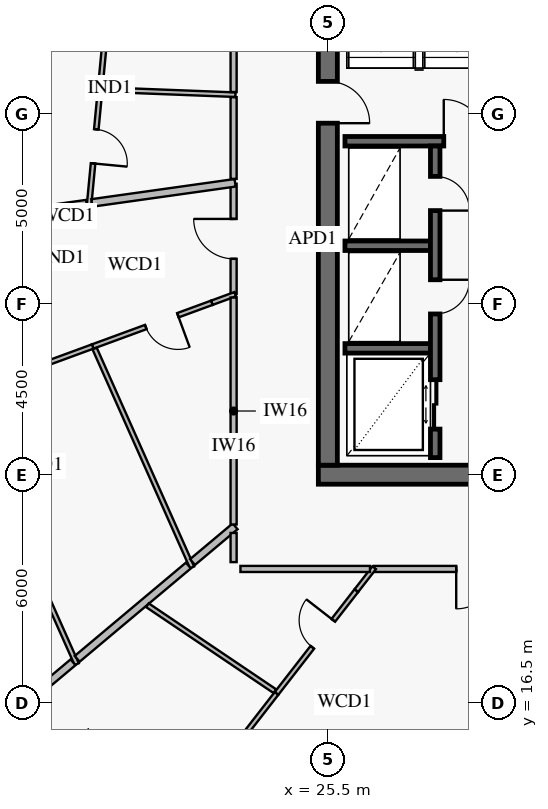
"""IFC4 building model, lengths in metres.
Left out: names, types, materials, properties, quantities, classifications, styles, units other than length and angle.
Written with IfcOpenShell. Run it as: python <this file> out.ifc"""

import sys

from ifc_helpers import new_model, si_unit, direction, frame, frame_2d, origin, place, context, subcontext, project, spatial, rectangle, extrude, element, fill, save


model = new_model("IFC4")
c1 = context("Model", 3, precision=1e-05, world=origin(), true_north=direction((0.0, 1.0)))
c2 = subcontext(c1, "Body", "Model", "MODEL_VIEW")
j1 = project(units=[si_unit("LENGTHUNIT", "METRE"), si_unit("PLANEANGLEUNIT", "RADIAN")], contexts=[c1])
p1 = place(None, origin())
s1 = spatial("IfcSite", under=j1, at=p1, CompositionType="ELEMENT")
p2 = place(p1, origin())
s2 = spatial("IfcBuilding", under=s1, at=p2, CompositionType="ELEMENT")
p3 = place(p2, frame((0.0, 0.0, 353.8)))
s3 = spatial("IfcBuildingStorey", under=s2, at=p3, CompositionType="ELEMENT", Elevation=353.8)
p4 = place(p3, frame((25.25, 22.5, 0.0), z_axis=(0.0, 0.0, 1.0), x_axis=(1.0, 0.0, 0.0)))
e1 = element("IfcWall", 1, at=p4, inside=s3, PredefinedType="SHEAR", context=c2, shape_type="SweptSolid", body=[
    extrude(rectangle(XDim=9.8, YDim=0.5, at=frame_2d((4.9, 0.0))), origin(), (0.0, 0.0, 1.0), 3.8),
])
p5 = place(p4, frame((4.15, 0.0, 0.0)))
e2 = element("IfcOpeningElement", 2, at=p5, cuts=e1, PredefinedType="OPENING", context=c2, shape_type="SweptSolid", body=[
    extrude(rectangle(XDim=1.5, YDim=2.15, at=frame_2d((0.75, 1.075))), frame((0.0, 0.262, 0.0), z_axis=(0.0, -1.0, 0.0), x_axis=(1.0, 0.0, 0.0)), (0.0, 0.0, 1.0), 0.524),
])
p6 = place(p3, frame((25.5, 22.75, 0.0), z_axis=(0.0, 0.0, 1.0), x_axis=(0.0, 1.0, 0.0)))
e3 = element("IfcWall", 3, at=p6, inside=s3, PredefinedType="SHEAR", context=c2, shape_type="SweptSolid", body=[
    extrude(rectangle(XDim=18.5, YDim=0.5, at=frame_2d((9.25, 0.0))), origin(), (0.0, 0.0, 1.0), 3.8),
])
p7 = place(p6, frame((9.0, 0.0, 0.0)))
e4 = element("IfcOpeningElement", 4, at=p7, cuts=e3, PredefinedType="OPENING", context=c2, shape_type="SweptSolid", body=[
    extrude(rectangle(XDim=1.1, YDim=2.15, at=frame_2d((0.55, 1.075))), frame((0.0, 0.262, 0.0), z_axis=(0.0, -1.0, 0.0), x_axis=(1.0, 0.0, 0.0)), (0.0, 0.0, 1.0), 0.524),
])
p8 = place(p3, frame((25.95, 31.275, 0.0), z_axis=(0.0, 0.0, 1.0), x_axis=(1.0, 0.0, 0.0)))
e5 = element("IfcWall", 5, at=p8, inside=s3, PredefinedType="SOLIDWALL", context=c2, shape_type="SweptSolid", body=[
    extrude(rectangle(XDim=20.1, YDim=0.25, at=frame_2d((10.05, 0.0))), origin(), (0.0, 0.0, 1.0), 3.8),
])
p9 = place(p8, frame((2.6, 0.0, 0.0)))
e6 = element("IfcOpeningElement", 6, at=p9, cuts=e5, PredefinedType="OPENING", context=c2, shape_type="SweptSolid", body=[
    extrude(rectangle(XDim=1.1, YDim=2.15, at=frame_2d((0.55, 1.075))), frame((0.0, 0.137, 0.0), z_axis=(0.0, -1.0, 0.0), x_axis=(1.0, 0.0, 0.0)), (0.0, 0.0, 1.0), 0.274),
])
p10 = place(p8, frame((10.6, 0.0, 0.0)))
e7 = element("IfcOpeningElement", 7, at=p10, cuts=e5, PredefinedType="OPENING", context=c2, shape_type="SweptSolid", body=[
    extrude(rectangle(XDim=1.1, YDim=2.15, at=frame_2d((0.55, 1.075))), frame((0.0, 0.137, 0.0), z_axis=(0.0, -1.0, 0.0), x_axis=(1.0, 0.0, 0.0)), (0.0, 0.0, 1.0), 0.274),
])
p11 = place(p8, frame((16.35, 0.0, 0.0)))
e8 = element("IfcOpeningElement", 8, at=p11, cuts=e5, PredefinedType="OPENING", context=c2, shape_type="SweptSolid", body=[
    extrude(rectangle(XDim=1.1, YDim=2.15, at=frame_2d((0.55, 1.075))), frame((0.0, 0.137, 0.0), z_axis=(0.0, -1.0, 0.0), x_axis=(1.0, 0.0, 0.0)), (0.0, 0.0, 1.0), 0.274),
])
for number, where, z_axis, x_axis in (
    (9, (25.95, 25.825, 0.0), (0.0, 0.0, 1.0), (1.0, 0.0, 0.0)),
    (10, (25.95, 28.525, 0.0), (0.0, 0.0, 1.0), (1.0, 0.0, 0.0)),
):
    element("IfcWall", number, at=place(p3, frame(where, z_axis=z_axis, x_axis=x_axis)), inside=s3, PredefinedType="SOLIDWALL", context=c2, shape_type="SweptSolid", body=[
        extrude(rectangle(XDim=2.25, YDim=0.25, at=frame_2d((1.125, 0.0))), origin(), (0.0, 0.0, 1.0), 3.8),
    ])
p12 = place(p3, frame((28.325, 22.95, 0.0), z_axis=(0.0, 0.0, 1.0), x_axis=(0.0, 1.0, 0.0)))
e11 = element("IfcWall", 11, at=p12, inside=s3, PredefinedType="SOLIDWALL", context=c2, shape_type="SweptSolid", body=[
    extrude(rectangle(XDim=8.2, YDim=0.25, at=frame_2d((4.1, 0.0))), origin(), (0.0, 0.0, 1.0), 3.8),
])
p13 = place(p12, frame((0.75, 0.0, 0.0)))
e12 = element("IfcOpeningElement", 12, at=p13, cuts=e11, PredefinedType="OPENING", context=c2, shape_type="SweptSolid", body=[
    extrude(rectangle(XDim=1.3, YDim=2.3, at=frame_2d((0.65, 1.15))), frame((0.0, 0.137, 0.0), z_axis=(0.0, -1.0, 0.0), x_axis=(1.0, 0.0, 0.0)), (0.0, 0.0, 1.0), 0.274),
])
p14 = place(p12, frame((3.78, 0.0, 0.0)))
e13 = element("IfcOpeningElement", 13, at=p14, cuts=e11, PredefinedType="OPENING", context=c2, shape_type="SweptSolid", body=[
    extrude(rectangle(XDim=0.9, YDim=2.1, at=frame_2d((0.45, 1.05))), frame((0.0, 0.137, 0.0), z_axis=(0.0, -1.0, 0.0), x_axis=(1.0, 0.0, 0.0)), (0.0, 0.0, 1.0), 0.274),
])
p15 = place(p12, frame((6.5, 0.0, 0.0)))
e14 = element("IfcOpeningElement", 14, at=p15, cuts=e11, PredefinedType="OPENING", context=c2, shape_type="SweptSolid", body=[
    extrude(rectangle(XDim=0.9, YDim=2.1, at=frame_2d((0.45, 1.05))), frame((0.0, 0.137, 0.0), z_axis=(0.0, -1.0, 0.0), x_axis=(1.0, 0.0, 0.0)), (0.0, 0.0, 1.0), 0.274),
])
p16 = place(p3, frame((19.979, 37.585, 0.0), z_axis=(0.0, 0.0, 1.0), x_axis=(-0.094824773931, -0.995493979012, 0.0)))
e15 = element("IfcWall", 15, at=p16, inside=s3, PredefinedType="PARTITIONING", context=c2, shape_type="SweptSolid", body=[
    extrude(rectangle(XDim=8.082, YDim=0.12, at=frame_2d((4.041, 0.0))), origin(), (0.0, 0.0, 1.0), 2.8),
])
p17 = place(p16, frame((2.061, 0.0, 0.0)))
e16 = element("IfcOpeningElement", 16, at=p17, cuts=e15, PredefinedType="OPENING", context=c2, shape_type="SweptSolid", body=[
    extrude(rectangle(XDim=0.95, YDim=2.1, at=frame_2d((0.475, 1.05))), frame((0.0, 0.072, 0.0), z_axis=(0.0, -1.0, 0.0), x_axis=(1.0, 0.0, 0.0)), (0.0, 0.0, 1.0), 0.144),
])
p18 = place(p16, frame((6.024, 0.0, 0.0)))
e17 = element("IfcOpeningElement", 17, at=p18, cuts=e15, PredefinedType="OPENING", context=c2, shape_type="SweptSolid", body=[
    extrude(rectangle(XDim=0.9, YDim=2.1, at=frame_2d((0.45, 1.05))), frame((0.0, 0.072, 0.0), z_axis=(0.0, -1.0, 0.0), x_axis=(1.0, 0.0, 0.0)), (0.0, 0.0, 1.0), 0.144),
])
p19 = place(p3, frame((18.5, 38.091, 0.0), z_axis=(0.0, 0.0, 1.0), x_axis=(-0.094793396489, -0.995496967339, 0.0)))
e18 = element("IfcWall", 18, at=p19, inside=s3, PredefinedType="PARTITIONING", context=c2, shape_type="SweptSolid", body=[
    extrude(rectangle(XDim=8.808, YDim=0.12, at=frame_2d((4.404, 0.0))), origin(), (0.0, 0.0, 1.0), 2.8),
])
p20 = place(p19, frame((1.072, 0.0, 0.0)))
e19 = element("IfcOpeningElement", 19, at=p20, cuts=e18, PredefinedType="OPENING", context=c2, shape_type="SweptSolid", body=[
    extrude(rectangle(XDim=0.95, YDim=2.1, at=frame_2d((0.475, 1.05))), frame((0.0, 0.072, 0.0), z_axis=(0.0, -1.0, 0.0), x_axis=(1.0, 0.0, 0.0)), (0.0, 0.0, 1.0), 0.144),
])
p21 = place(p19, frame((3.929, 0.0, 0.0)))
e20 = element("IfcOpeningElement", 20, at=p21, cuts=e18, PredefinedType="OPENING", context=c2, shape_type="SweptSolid", body=[
    extrude(rectangle(XDim=0.95, YDim=2.1, at=frame_2d((0.475, 1.05))), frame((0.0, 0.072, 0.0), z_axis=(0.0, -1.0, 0.0), x_axis=(1.0, 0.0, 0.0)), (0.0, 0.0, 1.0), 0.144),
])
p22 = place(p19, frame((6.786, 0.0, 0.0)))
e21 = element("IfcOpeningElement", 21, at=p22, cuts=e18, PredefinedType="OPENING", context=c2, shape_type="SweptSolid", body=[
    extrude(rectangle(XDim=0.95, YDim=2.1, at=frame_2d((0.475, 1.05))), frame((0.0, 0.072, 0.0), z_axis=(0.0, -1.0, 0.0), x_axis=(1.0, 0.0, 0.0)), (0.0, 0.0, 1.0), 0.144),
])
p23 = place(p3, frame((22.45, 27.025, 0.0), z_axis=(0.0, 0.0, 1.0), x_axis=(-0.938729085526, -0.344655921155, 0.0)))
e22 = element("IfcWall", 22, at=p23, inside=s3, PredefinedType="PARTITIONING", context=c2, shape_type="SweptSolid", body=[
    extrude(rectangle(XDim=3.343, YDim=0.12, at=frame_2d((1.671, 0.0))), origin(), (0.0, 0.0, 1.0), 3.35),
])
p24 = place(p23, frame((0.954, 0.0, 0.0)))
e23 = element("IfcOpeningElement", 23, at=p24, cuts=e22, PredefinedType="OPENING", context=c2, shape_type="SweptSolid", body=[
    extrude(rectangle(XDim=0.9, YDim=2.1, at=frame_2d((0.45, 1.05))), frame((0.0, 0.072, 0.0), z_axis=(0.0, -1.0, 0.0), x_axis=(1.0, 0.0, 0.0)), (0.0, 0.0, 1.0), 0.144),
])
p25 = place(p3, frame((19.312, 25.873, 0.0), z_axis=(0.0, 0.0, 1.0), x_axis=(-0.938737752341, -0.344632314692, 0.0)))
e24 = element("IfcWall", 24, at=p25, inside=s3, PredefinedType="PARTITIONING", context=c2, shape_type="SweptSolid", body=[
    extrude(rectangle(XDim=3.818, YDim=0.12, at=frame_2d((1.909, 0.0))), origin(), (0.0, 0.0, 1.0), 3.0),
])
p26 = place(p25, frame((1.409, 0.0, 0.0)))
e25 = element("IfcOpeningElement", 25, at=p26, cuts=e24, PredefinedType="OPENING", context=c2, shape_type="SweptSolid", body=[
    extrude(rectangle(XDim=0.95, YDim=2.1, at=frame_2d((0.475, 1.05))), frame((0.0, 0.072, 0.0), z_axis=(0.0, -1.0, 0.0), x_axis=(1.0, 0.0, 0.0)), (0.0, 0.0, 1.0), 0.144),
])
p27 = place(p3, frame((15.779, 24.504, 0.0), z_axis=(0.0, 0.0, 1.0), x_axis=(0.406754151675, -0.913537662111, 0.0)))
e26 = element("IfcWall", 26, at=p27, inside=s3, PredefinedType="PARTITIONING", context=c2, shape_type="SweptSolid", body=[
    extrude(rectangle(XDim=7.652, YDim=0.12, at=frame_2d((3.826, 0.0))), origin(), (0.0, 0.0, 1.0), 3.35),
])
p28 = place(p27, frame((3.267, 0.0, 0.0)))
e27 = element("IfcOpeningElement", 27, at=p28, cuts=e26, PredefinedType="OPENING", context=c2, shape_type="SweptSolid", body=[
    extrude(rectangle(XDim=0.95, YDim=2.1, at=frame_2d((0.475, 1.05))), frame((0.0, 0.072, 0.0), z_axis=(0.0, -1.0, 0.0), x_axis=(1.0, 0.0, 0.0)), (0.0, 0.0, 1.0), 0.144),
])
p29 = place(p3, frame((23.02, 30.156, 0.0), z_axis=(0.0, 0.0, 1.0), x_axis=(0.0, -1.0, 0.0)))
e28 = element("IfcWall", 28, at=p29, inside=s3, PredefinedType="PARTITIONING", context=c2, shape_type="SweptSolid", body=[
    extrude(rectangle(XDim=2.9, YDim=0.16, at=frame_2d((1.45, 0.0))), origin(), (0.0, 0.0, 1.0), 2.8),
])
p30 = place(p29, frame((0.925, 0.0, 0.0)))
e29 = element("IfcOpeningElement", 29, at=p30, cuts=e28, PredefinedType="OPENING", context=c2, shape_type="SweptSolid", body=[
    extrude(rectangle(XDim=1.05, YDim=2.15, at=frame_2d((0.525, 1.075))), frame((0.0, 0.092, 0.0), z_axis=(0.0, -1.0, 0.0), x_axis=(1.0, 0.0, 0.0)), (0.0, 0.0, 1.0), 0.184),
])
p31 = place(p3, frame((26.251, 19.45, 0.0), z_axis=(0.0, 0.0, 1.0), x_axis=(-0.613467016109, -0.789720342999, 0.0)))
e30 = element("IfcWall", 30, at=p31, inside=s3, PredefinedType="PARTITIONING", context=c2, shape_type="SweptSolid", body=[
    extrude(rectangle(XDim=3.427, YDim=0.12, at=frame_2d((1.713, 0.0))), origin(), (0.0, 0.0, 1.0), 3.35),
])
p32 = place(p31, frame((0.989, 0.0, 0.0)))
e31 = element("IfcOpeningElement", 31, at=p32, cuts=e30, PredefinedType="OPENING", context=c2, shape_type="SweptSolid", body=[
    extrude(rectangle(XDim=0.9, YDim=2.1, at=frame_2d((0.45, 1.05))), frame((0.0, 0.072, 0.0), z_axis=(0.0, -1.0, 0.0), x_axis=(1.0, 0.0, 0.0)), (0.0, 0.0, 1.0), 0.144),
])
p33 = place(p3, frame((24.149, 16.744, 0.0), z_axis=(0.0, 0.0, 1.0), x_axis=(-0.613439949778, -0.789741367801, 0.0)))
e32 = element("IfcWall", 32, at=p33, inside=s3, PredefinedType="PARTITIONING", context=c2, shape_type="SweptSolid", body=[
    extrude(rectangle(XDim=3.073, YDim=0.12, at=frame_2d((1.536, 0.0))), origin(), (0.0, 0.0, 1.0), 3.35),
])
p34 = place(p33, frame((1.628, 0.0, 0.0)))
e33 = element("IfcOpeningElement", 33, at=p34, cuts=e32, PredefinedType="OPENING", context=c2, shape_type="SweptSolid", body=[
    extrude(rectangle(XDim=0.95, YDim=2.1, at=frame_2d((0.475, 1.05))), frame((0.0, 0.072, 0.0), z_axis=(0.0, -1.0, 0.0), x_axis=(1.0, 0.0, 0.0)), (0.0, 0.0, 1.0), 0.144),
])
p35 = place(p3, frame((26.719, 20.02, 0.0), z_axis=(0.0, 0.0, 1.0), x_axis=(1.0, 0.0, 0.0)))
e34 = element("IfcWall", 34, at=p35, inside=s3, PredefinedType="PARTITIONING", context=c2, shape_type="SweptSolid", body=[
    extrude(rectangle(XDim=5.367, YDim=0.16, at=frame_2d((2.684, 0.0))), origin(), (0.0, 0.0, 1.0), 3.35),
])
p36 = place(p35, frame((2.158, 0.0, 0.0)))
e35 = element("IfcOpeningElement", 35, at=p36, cuts=e34, PredefinedType="OPENING", context=c2, shape_type="SweptSolid", body=[
    extrude(rectangle(XDim=1.05, YDim=2.15, at=frame_2d((0.525, 1.075))), frame((0.0, 0.092, 0.0), z_axis=(0.0, -1.0, 0.0), x_axis=(1.0, 0.0, 0.0)), (0.0, 0.0, 1.0), 0.184),
])
p37 = place(p3, frame((23.07, 32.5, 0.0), z_axis=(0.0, 0.0, 1.0), x_axis=(-0.999254664498, 0.038602013934, 0.0)))
e36 = element("IfcWall", 36, at=p37, inside=s3, PredefinedType="PARTITIONING", context=c2, shape_type="SweptSolid", body=[
    extrude(rectangle(XDim=3.498, YDim=0.12, at=frame_2d((1.749, 0.0))), origin(), (0.0, 0.0, 1.0), 3.35),
])
p38 = place(p3, frame((23.06, 30.181, 0.0), z_axis=(0.0, 0.0, 1.0), x_axis=(-0.990263903047, -0.139202738201, 0.0)))
e37 = element("IfcWall", 37, at=p38, inside=s3, PredefinedType="PARTITIONING", context=c2, shape_type="SweptSolid", body=[
    extrude(rectangle(XDim=3.806, YDim=0.2, at=frame_2d((1.903, 0.0))), origin(), (0.0, 0.0, 1.0), 3.35),
])
p39 = place(p3, frame((19.153, 29.632, 0.0), z_axis=(0.0, 0.0, 1.0), x_axis=(-0.990245854096, -0.139331074948, 0.0)))
e38 = element("IfcWall", 38, at=p39, inside=s3, PredefinedType="PARTITIONING", context=c2, shape_type="SweptSolid", body=[
    extrude(rectangle(XDim=1.423, YDim=0.2, at=frame_2d((0.711, 0.0))), origin(), (0.0, 0.0, 1.0), 3.35),
])
p40 = place(p3, frame((23.063, 27.25, 0.0), z_axis=(0.0, 0.0, 1.0), x_axis=(-0.938807874659, -0.344441249676, 0.0)))
e39 = element("IfcWall", 39, at=p40, inside=s3, PredefinedType="PARTITIONING", context=c2, shape_type="SweptSolid", body=[
    extrude(rectangle(XDim=0.654, YDim=0.12, at=frame_2d((0.327, 0.0))), origin(), (0.0, 0.0, 1.0), 3.35),
])
p41 = place(p3, frame((19.363, 25.82, 0.0), z_axis=(0.0, 0.0, 1.0), x_axis=(0.406702567346, -0.913560628374, 0.0)))
e40 = element("IfcWall", 40, at=p41, inside=s3, PredefinedType="PARTITIONING", context=c2, shape_type="SweptSolid", body=[
    extrude(rectangle(XDim=6.304, YDim=0.12, at=frame_2d((3.152, 0.0))), origin(), (0.0, 0.0, 1.0), 3.0),
])
p42 = place(p3, frame((23.06, 21.142, 0.0), z_axis=(0.0, 0.0, 1.0), x_axis=(-0.766056395585, -0.642773365024, 0.0)))
e41 = element("IfcWall", 41, at=p42, inside=s3, PredefinedType="PARTITIONING", context=c2, shape_type="SweptSolid", body=[
    extrude(rectangle(XDim=1.463, YDim=0.2, at=frame_2d((0.732, 0.0))), origin(), (0.0, 0.0, 1.0), 3.35),
])
p43 = place(p3, frame((21.831, 20.111, 0.0), z_axis=(0.0, 0.0, 1.0), x_axis=(-0.766011894934, -0.642826397108, 0.0)))
e42 = element("IfcWall", 42, at=p43, inside=s3, PredefinedType="PARTITIONING", context=c2, shape_type="SweptSolid", body=[
    extrude(rectangle(XDim=3.821, YDim=0.2, at=frame_2d((1.911, 0.0))), origin(), (0.0, 0.0, 1.0), 3.0),
])
p44 = place(p3, frame((18.795, 17.563, 0.0), z_axis=(0.0, 0.0, 1.0), x_axis=(-0.766060718976, -0.642768212376, 0.0)))
e43 = element("IfcWall", 43, at=p44, inside=s3, PredefinedType="PARTITIONING", context=c2, shape_type="SweptSolid", body=[
    extrude(rectangle(XDim=1.986, YDim=0.2, at=frame_2d((0.993, 0.0))), origin(), (0.0, 0.0, 1.0), 2.77),
])
p45 = place(p3, frame((26.719, 20.052, 0.0), z_axis=(0.0, 0.0, 1.0), x_axis=(-0.613430954659, -0.789748354773, 0.0)))
e44 = element("IfcWall", 44, at=p45, inside=s3, PredefinedType="PARTITIONING", context=c2, shape_type="SweptSolid", body=[
    extrude(rectangle(XDim=0.763, YDim=0.12, at=frame_2d((0.381, 0.0))), origin(), (0.0, 0.0, 1.0), 3.35),
])
p46 = place(p3, frame((20.752, 19.065, 0.0), z_axis=(0.0, 0.0, 1.0), x_axis=(0.829050018, -0.559174451896, 0.0)))
e45 = element("IfcWall", 45, at=p46, inside=s3, PredefinedType="PARTITIONING", context=c2, shape_type="SweptSolid", body=[
    extrude(rectangle(XDim=4.047, YDim=0.12, at=frame_2d((2.024, 0.0))), origin(), (0.0, 0.0, 1.0), 2.8),
])
p47 = place(p3, frame((32.079, 19.932, 0.0), z_axis=(0.0, 0.0, 1.0), x_axis=(-0.309007075995, -0.951059738915, 0.0)))
e46 = element("IfcWall", 46, at=p47, inside=s3, PredefinedType="PARTITIONING", context=c2, shape_type="SweptSolid", body=[
    extrude(rectangle(XDim=10.552, YDim=0.2, at=frame_2d((5.276, 0.0))), origin(), (0.0, 0.0, 1.0), 3.35),
])
p48 = place(p3, frame((23.02, 36.418, 0.0), z_axis=(0.0, 0.0, 1.0), x_axis=(0.0, -1.0, 0.0)))
e47 = element("IfcWall", 47, at=p48, inside=s3, PredefinedType="PARTITIONING", context=c2, shape_type="SweptSolid", body=[
    extrude(rectangle(XDim=3.848, YDim=0.16, at=frame_2d((1.924, 0.0))), origin(), (0.0, 0.0, 1.0), 2.8),
])
p49 = place(p3, frame((23.02, 32.434, 0.0), z_axis=(0.0, 0.0, 1.0), x_axis=(0.0, -1.0, 0.0)))
e48 = element("IfcWall", 48, at=p49, inside=s3, PredefinedType="PARTITIONING", context=c2, shape_type="SweptSolid", body=[
    extrude(rectangle(XDim=2.149, YDim=0.16, at=frame_2d((1.074, 0.0))), origin(), (0.0, 0.0, 1.0), 3.35),
])
p50 = place(p3, frame((23.02, 27.162, 0.0), z_axis=(0.0, 0.0, 1.0), x_axis=(0.0, -1.0, 0.0)))
e49 = element("IfcWall", 49, at=p50, inside=s3, PredefinedType="PARTITIONING", context=c2, shape_type="SweptSolid", body=[
    extrude(rectangle(XDim=5.972, YDim=0.16, at=frame_2d((2.986, 0.0))), origin(), (0.0, 0.0, 1.0), 3.35),
])
p51 = place(p3, frame((23.2, 20.02, 0.0), z_axis=(0.0, 0.0, 1.0), x_axis=(1.0, 0.0, 0.0)))
e50 = element("IfcWall", 50, at=p51, inside=s3, PredefinedType="PARTITIONING", context=c2, shape_type="SweptSolid", body=[
    extrude(rectangle(XDim=3.408, YDim=0.16, at=frame_2d((1.704, 0.0))), origin(), (0.0, 0.0, 1.0), 2.8),
])
p52 = place(p3, frame((23.02, 20.968, 0.0), z_axis=(0.0, 0.0, 1.0), x_axis=(0.0, -1.0, 0.0)))
e51 = element("IfcWall", 51, at=p52, inside=s3, PredefinedType="PARTITIONING", context=c2, shape_type="SweptSolid", body=[
    extrude(rectangle(XDim=0.768, YDim=0.16, at=frame_2d((0.384, 0.0))), origin(), (0.0, 0.0, 1.0), 3.35),
])
p53 = place(p7, frame((1.1, 0.0, 0.0), z_axis=(0.0, 0.0, 1.0), x_axis=(-1.0, 0.0, 0.0)))
e52 = element("IfcDoor", 52, at=p53, inside=s3, OperationType="SINGLE_SWING_RIGHT", PredefinedType="USERDEFINED", context=c2, shape_type="SweptSolid", body=[
    extrude(rectangle(XDim=1.1, YDim=2.15, at=frame_2d((0.55, 1.075))), frame((0.0, 0.025, 0.0), z_axis=(0.0, -1.0, 0.0), x_axis=(1.0, 0.0, 0.0)), (0.0, 0.0, 1.0), 0.05),
])
fill(e4, e52)
p54 = place(p9, origin())
e53 = element("IfcDoor", 53, at=p54, inside=s3, OperationType="SINGLE_SWING_LEFT", PredefinedType="USERDEFINED", context=c2, shape_type="SweptSolid", body=[
    extrude(rectangle(XDim=1.1, YDim=2.15, at=frame_2d((0.55, 1.075))), frame((0.0, 0.025, 0.0), z_axis=(0.0, -1.0, 0.0), x_axis=(1.0, 0.0, 0.0)), (0.0, 0.0, 1.0), 0.05),
])
fill(e6, e53)
p55 = place(p13, frame((1.3, 0.0, 0.0), z_axis=(0.0, 0.0, 1.0), x_axis=(-1.0, 0.0, 0.0)))
e54 = element("IfcDoor", 54, at=p55, inside=s3, OperationType="DOUBLE_DOOR_SLIDING", PredefinedType="DOOR", context=c2, shape_type="SweptSolid", body=[
    extrude(rectangle(XDim=1.3, YDim=2.3, at=frame_2d((0.65, 1.15))), frame((0.0, 0.025, 0.0), z_axis=(0.0, -1.0, 0.0), x_axis=(1.0, 0.0, 0.0)), (0.0, 0.0, 1.0), 0.05),
])
fill(e12, e54)
p56 = place(p14, frame((0.9, 0.0, 0.0), z_axis=(0.0, 0.0, 1.0), x_axis=(-1.0, 0.0, 0.0)))
e55 = element("IfcDoor", 55, at=p56, inside=s3, OperationType="SINGLE_SWING_LEFT", PredefinedType="DOOR", context=c2, shape_type="SweptSolid", body=[
    extrude(rectangle(XDim=0.9, YDim=2.1, at=frame_2d((0.45, 1.05))), frame((0.0, 0.025, 0.0), z_axis=(0.0, -1.0, 0.0), x_axis=(1.0, 0.0, 0.0)), (0.0, 0.0, 1.0), 0.05),
])
fill(e13, e55)
p57 = place(p15, frame((0.9, 0.0, 0.0), z_axis=(0.0, 0.0, 1.0), x_axis=(-1.0, 0.0, 0.0)))
e56 = element("IfcDoor", 56, at=p57, inside=s3, OperationType="SINGLE_SWING_RIGHT", PredefinedType="DOOR", context=c2, shape_type="SweptSolid", body=[
    extrude(rectangle(XDim=0.9, YDim=2.1, at=frame_2d((0.45, 1.05))), frame((0.0, 0.025, 0.0), z_axis=(0.0, -1.0, 0.0), x_axis=(1.0, 0.0, 0.0)), (0.0, 0.0, 1.0), 0.05),
])
fill(e14, e56)
p58 = place(p18, origin())
e57 = element("IfcDoor", 57, at=p58, inside=s3, OperationType="SINGLE_SWING_RIGHT", PredefinedType="DOOR", context=c2, shape_type="SweptSolid", body=[
    extrude(rectangle(XDim=0.9, YDim=2.1, at=frame_2d((0.45, 1.05))), frame((0.0, 0.025, 0.0), z_axis=(0.0, -1.0, 0.0), x_axis=(1.0, 0.0, 0.0)), (0.0, 0.0, 1.0), 0.05),
])
fill(e17, e57)
p59 = place(p24, origin())
e58 = element("IfcDoor", 58, at=p59, inside=s3, OperationType="SINGLE_SWING_LEFT", PredefinedType="DOOR", context=c2, shape_type="SweptSolid", body=[
    extrude(rectangle(XDim=0.9, YDim=2.1, at=frame_2d((0.45, 1.05))), frame((0.0, 0.025, 0.0), z_axis=(0.0, -1.0, 0.0), x_axis=(1.0, 0.0, 0.0)), (0.0, 0.0, 1.0), 0.05),
])
fill(e23, e58)
p60 = place(p30, frame((1.05, 0.0, 0.0), z_axis=(0.0, 0.0, 1.0), x_axis=(-1.0, 0.0, 0.0)))
e59 = element("IfcDoor", 59, at=p60, inside=s3, OperationType="SINGLE_SWING_RIGHT", PredefinedType="DOOR", context=c2, shape_type="SweptSolid", body=[
    extrude(rectangle(XDim=1.05, YDim=2.15, at=frame_2d((0.525, 1.075))), frame((0.0, 0.025, 0.0), z_axis=(0.0, -1.0, 0.0), x_axis=(1.0, 0.0, 0.0)), (0.0, 0.0, 1.0), 0.05),
])
fill(e29, e59)
p61 = place(p32, frame((0.9, 0.0, 0.0), z_axis=(0.0, 0.0, 1.0), x_axis=(-1.0, 0.0, 0.0)))
e60 = element("IfcDoor", 60, at=p61, inside=s3, OperationType="SINGLE_SWING_RIGHT", PredefinedType="DOOR", context=c2, shape_type="SweptSolid", body=[
    extrude(rectangle(XDim=0.9, YDim=2.1, at=frame_2d((0.45, 1.05))), frame((0.0, 0.025, 0.0), z_axis=(0.0, -1.0, 0.0), x_axis=(1.0, 0.0, 0.0)), (0.0, 0.0, 1.0), 0.05),
])
fill(e31, e60)
p62 = place(p36, frame((1.05, 0.0, 0.0), z_axis=(0.0, 0.0, 1.0), x_axis=(-1.0, 0.0, 0.0)))
e61 = element("IfcDoor", 61, at=p62, inside=s3, OperationType="SINGLE_SWING_RIGHT", PredefinedType="DOOR", context=c2, shape_type="SweptSolid", body=[
    extrude(rectangle(XDim=1.05, YDim=2.15, at=frame_2d((0.525, 1.075))), frame((0.0, 0.025, 0.0), z_axis=(0.0, -1.0, 0.0), x_axis=(1.0, 0.0, 0.0)), (0.0, 0.0, 1.0), 0.05),
])
fill(e35, e61)
save(model, sys.argv[1])
